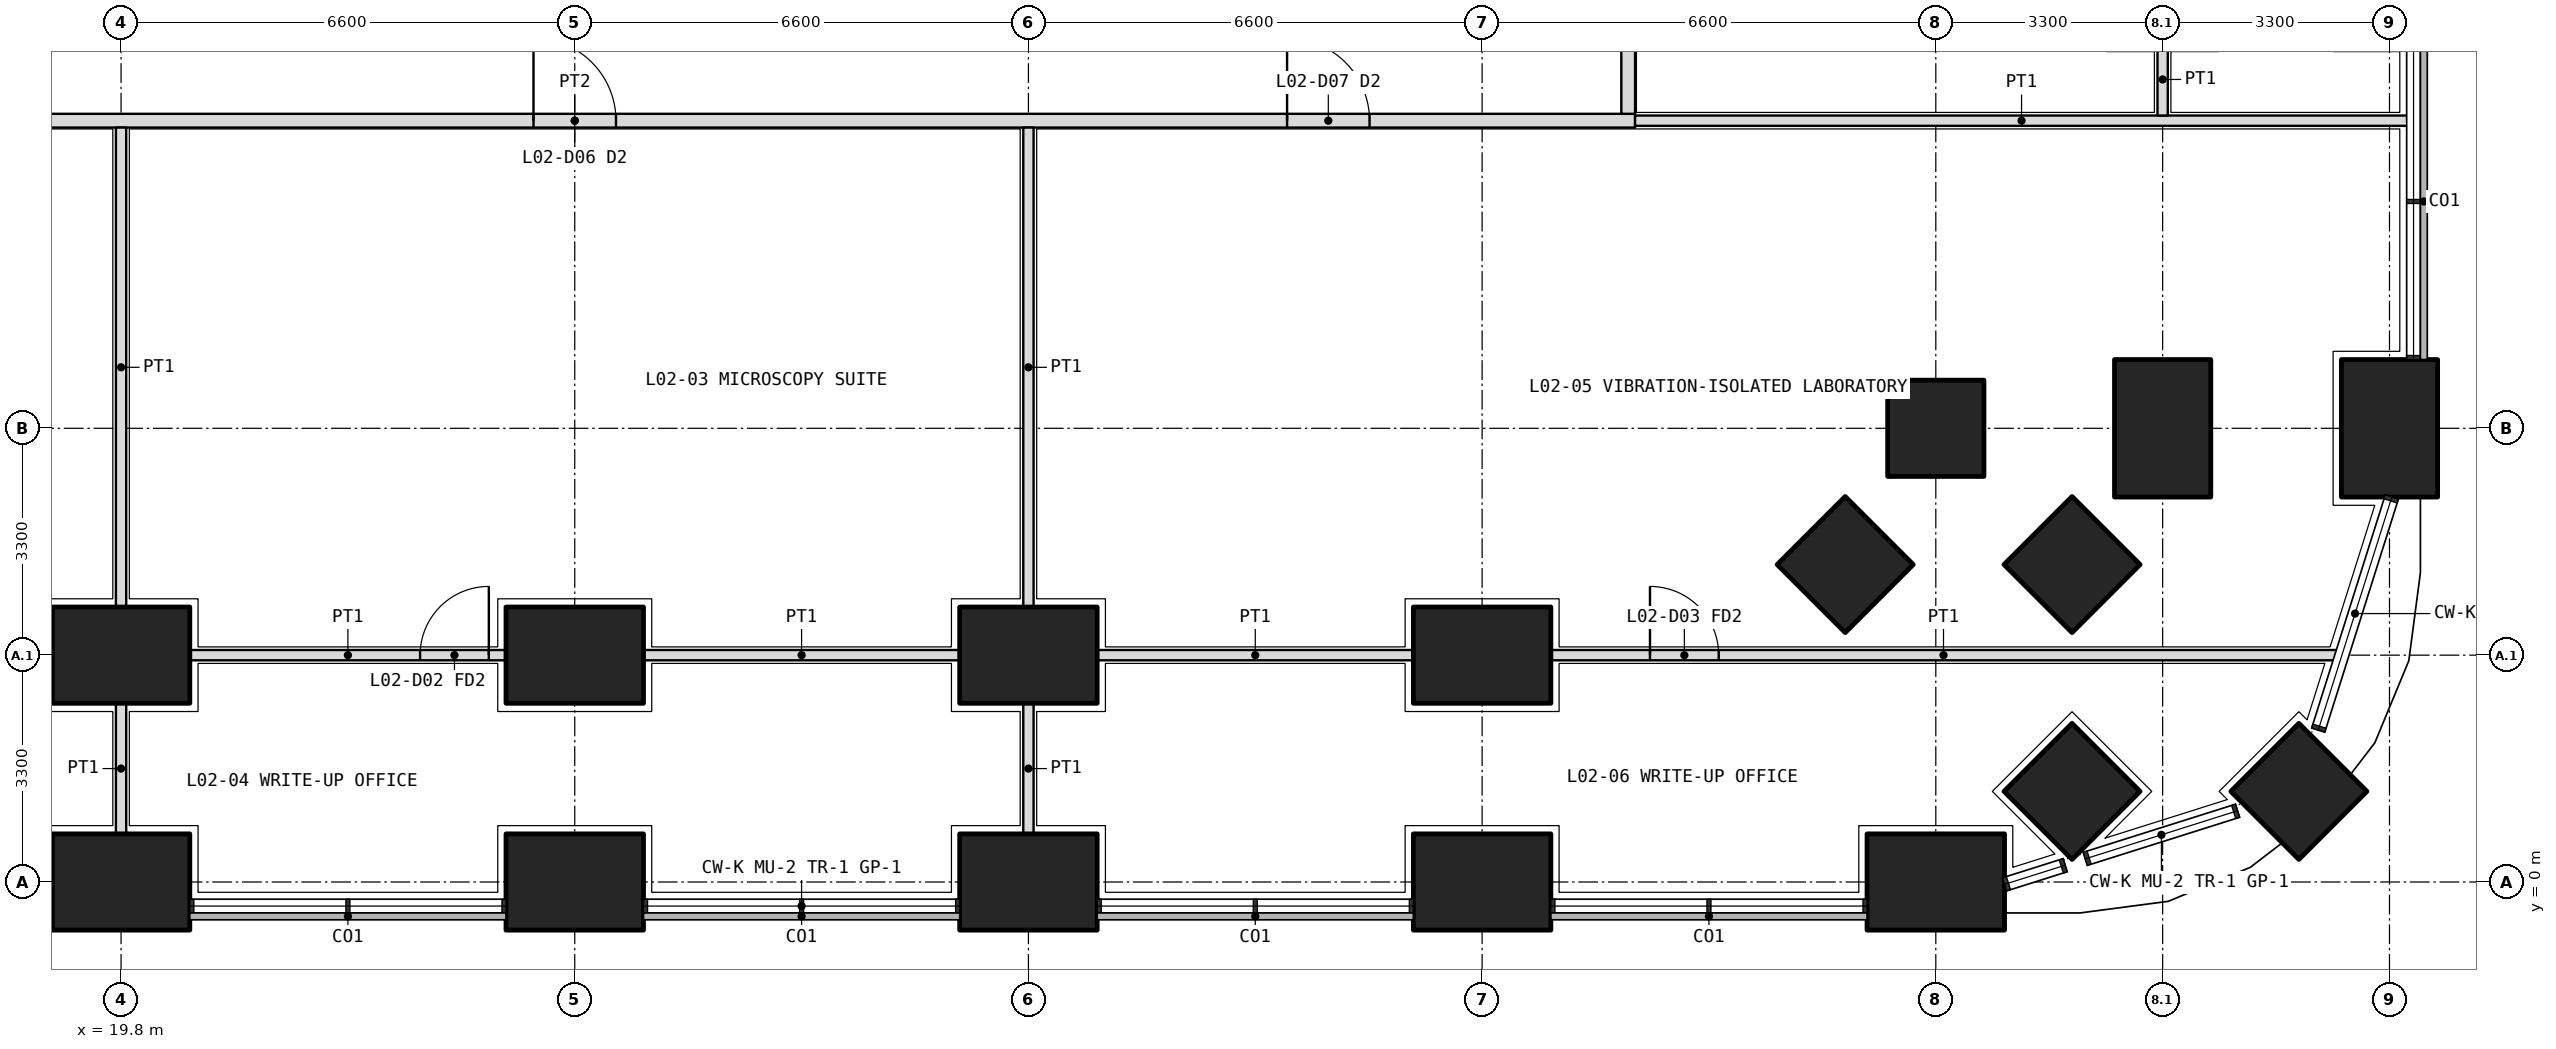
"""IFC4 building model, lengths in metres.
Left out: names, types, materials, properties, quantities, classifications, styles, units other than length and angle.
Written with IfcOpenShell. Run it as: python <this file> out.ifc"""

import sys

from ifc_helpers import new_model, si_unit, direction, frame, frame_2d, origin, origin_2d, place, context, subcontext, project, spatial, rectangle, extrude, element, fill, save


model = new_model("IFC4")
c1 = context("Model", 3, precision=1e-05, world=origin(), true_north=direction((0.0, 1.0)))
c2 = subcontext(c1, "Body", "Model", "MODEL_VIEW")
j1 = project(units=[si_unit("LENGTHUNIT", "METRE"), si_unit("PLANEANGLEUNIT", "RADIAN")], contexts=[c1])
p1 = place(None, origin())
s1 = spatial("IfcSite", under=j1, at=p1, CompositionType="ELEMENT")
p2 = place(p1, origin())
s2 = spatial("IfcBuilding", under=s1, at=p2, CompositionType="ELEMENT")
p3 = place(p2, frame((0.0, 0.0, 12.6)))
s3 = spatial("IfcBuildingStorey", under=s2, at=p3, CompositionType="ELEMENT", Elevation=12.6)
p4 = place(p3, frame((51.482, 1.318, 0.0), z_axis=(0.0, 0.0, 1.0), x_axis=(0.707106781187, 0.707106781187, 0.0)))
e1 = element("IfcColumn", 1, at=p4, inside=s3, PredefinedType="COLUMN", context=c2, shape_type="SweptSolid", body=[
    extrude(rectangle(XDim=1.4, YDim=1.4, at=origin_2d()), origin(), (0.0, 0.0, 1.0), 4.5),
])
for number, where, z_axis, x_axis in (
    (2, (19.8, 0.0, 0.0), (0.0, 0.0, 1.0), (1.0, 0.0, 0.0)),
    (3, (26.4, 0.0, 0.0), (0.0, 0.0, 1.0), (1.0, 0.0, 0.0)),
    (4, (33.0, 0.0, 0.0), (0.0, 0.0, 1.0), (1.0, 0.0, 0.0)),
    (5, (39.6, 0.0, 0.0), (0.0, 0.0, 1.0), (1.0, 0.0, 0.0)),
    (6, (46.2, 0.0, 0.0), (0.0, 0.0, 1.0), (1.0, 0.0, 0.0)),
    (7, (52.8, 6.6, 0.0), (0.0, 0.0, 1.0), (0.0, 1.0, 0.0)),
):
    element("IfcColumn", number, at=place(p3, frame(where, z_axis=z_axis, x_axis=x_axis)), inside=s3, PredefinedType="COLUMN", context=c2, shape_type="SweptSolid", body=[
        extrude(rectangle(XDim=2.0, YDim=1.4, at=origin_2d()), origin(), (0.0, 0.0, 1.0), 4.5),
    ])
for number, where, z_axis, x_axis in (
    (8, (46.2, 6.6, 0.0), (0.0, 0.0, 1.0), (1.0, 0.0, 0.0)),
    (9, (48.182, 1.318, 0.0), (0.0, 0.0, 1.0), (0.707, 0.707, 0.0)),
):
    element("IfcColumn", number, at=place(p3, frame(where, z_axis=z_axis, x_axis=x_axis)), inside=s3, PredefinedType="COLUMN", context=c2, shape_type="SweptSolid", body=[
        extrude(rectangle(XDim=1.4, YDim=1.4, at=origin_2d()), origin(), (0.0, 0.0, 1.0), 4.5),
    ])
p5 = place(p3, frame((49.5, 6.6, 0.0), z_axis=(0.0, 0.0, 1.0), x_axis=(0.0, 1.0, 0.0)))
e10 = element("IfcColumn", 10, at=p5, inside=s3, PredefinedType="COLUMN", context=c2, shape_type="SweptSolid", body=[
    extrude(rectangle(XDim=2.0, YDim=1.4, at=origin_2d()), origin(), (0.0, 0.0, 1.0), 4.5),
])
p6 = place(p3, frame((48.182, 4.618, 0.0), z_axis=(0.0, 0.0, 1.0), x_axis=(0.707106781187, 0.707106781187, 0.0)))
e11 = element("IfcColumn", 11, at=p6, inside=s3, PredefinedType="COLUMN", context=c2, shape_type="SweptSolid", body=[
    extrude(rectangle(XDim=1.4, YDim=1.4, at=origin_2d()), origin(), (0.0, 0.0, 1.0), 4.5),
])
for number, where, z_axis, x_axis in (
    (12, (19.8, 3.3, 0.0), (0.0, 0.0, 1.0), (1.0, 0.0, 0.0)),
    (13, (26.4, 3.3, 0.0), (0.0, 0.0, 1.0), (1.0, 0.0, 0.0)),
    (14, (33.0, 3.3, 0.0), (0.0, 0.0, 1.0), (1.0, 0.0, 0.0)),
    (15, (39.6, 3.3, 0.0), (0.0, 0.0, 1.0), (1.0, 0.0, 0.0)),
):
    element("IfcColumn", number, at=place(p3, frame(where, z_axis=z_axis, x_axis=x_axis)), inside=s3, PredefinedType="COLUMN", context=c2, shape_type="SweptSolid", body=[
        extrude(rectangle(XDim=2.0, YDim=1.4, at=origin_2d()), origin(), (0.0, 0.0, 1.0), 4.5),
    ])
p7 = place(p3, frame((44.882, 4.618, 0.0), z_axis=(0.0, 0.0, 1.0), x_axis=(0.707106781187, 0.707106781187, 0.0)))
e16 = element("IfcColumn", 16, at=p7, inside=s3, PredefinedType="COLUMN", context=c2, shape_type="SweptSolid", body=[
    extrude(rectangle(XDim=1.4, YDim=1.4, at=origin_2d()), origin(), (0.0, 0.0, 1.0), 4.5),
])
p8 = place(p3, frame((10.975, 11.075, 0.0), z_axis=(0.0, 0.0, 1.0), x_axis=(1.0, 0.0, 0.0)))
e17 = element("IfcWall", 17, at=p8, inside=s3, PredefinedType="PARTITIONING", context=c2, shape_type="SweptSolid", body=[
    extrude(rectangle(XDim=30.85, YDim=0.2, at=frame_2d((15.425, 0.0))), origin(), (0.0, 0.0, 1.0), 3.15),
])
p9 = place(p8, frame((3.863, 0.0, 0.0)))
e18 = element("IfcOpeningElement", 18, at=p9, cuts=e17, PredefinedType="OPENING", context=c2, shape_type="SweptSolid", body=[
    extrude(rectangle(XDim=1.2, YDim=2.1, at=frame_2d((0.6, 1.05))), frame((0.0, 0.11, 0.0), z_axis=(0.0, -1.0, 0.0), x_axis=(1.0, 0.0, 0.0)), (0.0, 0.0, 1.0), 0.22),
])
p10 = place(p8, frame((14.825, 0.0, 0.0)))
e19 = element("IfcOpeningElement", 19, at=p10, cuts=e17, PredefinedType="OPENING", context=c2, shape_type="SweptSolid", body=[
    extrude(rectangle(XDim=1.2, YDim=2.1, at=frame_2d((0.6, 1.05))), frame((0.0, 0.11, 0.0), z_axis=(0.0, -1.0, 0.0), x_axis=(1.0, 0.0, 0.0)), (0.0, 0.0, 1.0), 0.22),
])
p11 = place(p8, frame((25.788, 0.0, 0.0)))
e20 = element("IfcOpeningElement", 20, at=p11, cuts=e17, PredefinedType="OPENING", context=c2, shape_type="SweptSolid", body=[
    extrude(rectangle(XDim=1.2, YDim=2.1, at=frame_2d((0.6, 1.05))), frame((0.0, 0.11, 0.0), z_axis=(0.0, -1.0, 0.0), x_axis=(1.0, 0.0, 0.0)), (0.0, 0.0, 1.0), 0.22),
])
p12 = place(p3, frame((41.725, 11.175, 0.0), z_axis=(0.0, 0.0, 1.0), x_axis=(0.0, 1.0, 0.0)))
e21 = element("IfcWall", 21, at=p12, inside=s3, PredefinedType="PARTITIONING", context=c2, shape_type="SweptSolid", body=[
    extrude(rectangle(XDim=23.85, YDim=0.2, at=frame_2d((11.925, 0.0))), origin(), (0.0, 0.0, 1.0), 3.15),
])
p13 = place(p12, frame((3.663, 0.0, 0.0)))
e22 = element("IfcOpeningElement", 22, at=p13, cuts=e21, PredefinedType="OPENING", context=c2, shape_type="SweptSolid", body=[
    extrude(rectangle(XDim=1.2, YDim=2.1, at=frame_2d((0.6, 1.05))), frame((0.0, 0.11, 0.0), z_axis=(0.0, -1.0, 0.0), x_axis=(1.0, 0.0, 0.0)), (0.0, 0.0, 1.0), 0.22),
])
p14 = place(p12, frame((9.625, 0.0, 0.0)))
e23 = element("IfcOpeningElement", 23, at=p14, cuts=e21, PredefinedType="OPENING", context=c2, shape_type="SweptSolid", body=[
    extrude(rectangle(XDim=1.0, YDim=2.1, at=frame_2d((0.5, 1.05))), frame((0.0, 0.11, 0.0), z_axis=(0.0, -1.0, 0.0), x_axis=(1.0, 0.0, 0.0)), (0.0, 0.0, 1.0), 0.22),
])
p15 = place(p12, frame((12.975, 0.0, 0.0)))
e24 = element("IfcOpeningElement", 24, at=p15, cuts=e21, PredefinedType="OPENING", context=c2, shape_type="SweptSolid", body=[
    extrude(rectangle(XDim=0.9, YDim=2.1, at=frame_2d((0.45, 1.05))), frame((0.0, 0.11, 0.0), z_axis=(0.0, -1.0, 0.0), x_axis=(1.0, 0.0, 0.0)), (0.0, 0.0, 1.0), 0.22),
])
p16 = place(p12, frame((18.025, 0.0, 0.0)))
e25 = element("IfcOpeningElement", 25, at=p16, cuts=e21, PredefinedType="OPENING", context=c2, shape_type="SweptSolid", body=[
    extrude(rectangle(XDim=1.0, YDim=2.1, at=frame_2d((0.5, 1.05))), frame((0.0, 0.11, 0.0), z_axis=(0.0, -1.0, 0.0), x_axis=(1.0, 0.0, 0.0)), (0.0, 0.0, 1.0), 0.22),
])
p17 = place(p12, frame((22.288, 0.0, 0.0)))
e26 = element("IfcOpeningElement", 26, at=p17, cuts=e21, PredefinedType="OPENING", context=c2, shape_type="SweptSolid", body=[
    extrude(rectangle(XDim=1.2, YDim=2.1, at=frame_2d((0.6, 1.05))), frame((0.0, 0.11, 0.0), z_axis=(0.0, -1.0, 0.0), x_axis=(1.0, 0.0, 0.0)), (0.0, 0.0, 1.0), 0.22),
])
p18 = place(p3, frame((53.07, 11.075, 0.0), z_axis=(0.0, 0.0, 1.0), x_axis=(-1.0, 0.0, 0.0)))
e27 = element("IfcWall", 27, at=p18, inside=s3, PredefinedType="PARTITIONING", context=c2, shape_type="SweptSolid", body=[
    extrude(rectangle(XDim=11.245, YDim=0.15, at=frame_2d((5.623, 0.0))), origin(), (0.0, 0.0, 1.0), 3.0),
])
p19 = place(p3, frame((20.8, 3.3, 0.0), z_axis=(0.0, 0.0, 1.0), x_axis=(1.0, 0.0, 0.0)))
e28 = element("IfcWall", 28, at=p19, inside=s3, PredefinedType="PARTITIONING", context=c2, shape_type="SweptSolid", body=[
    extrude(rectangle(XDim=4.6, YDim=0.15, at=frame_2d((2.3, 0.0))), origin(), (0.0, 0.0, 1.0), 4.2),
])
p20 = place(p19, frame((3.35, 0.0, 0.0)))
e29 = element("IfcOpeningElement", 29, at=p20, cuts=e28, PredefinedType="OPENING", context=c2, shape_type="SweptSolid", body=[
    extrude(rectangle(XDim=1.0, YDim=2.1, at=frame_2d((0.5, 1.05))), frame((0.0, 0.085, 0.0), z_axis=(0.0, -1.0, 0.0), x_axis=(1.0, 0.0, 0.0)), (0.0, 0.0, 1.0), 0.17),
])
for number, where, z_axis, x_axis in (
    (30, (27.4, 3.3, 0.0), (0.0, 0.0, 1.0), (1.0, 0.0, 0.0)),
    (31, (34.0, 3.3, 0.0), (0.0, 0.0, 1.0), (1.0, 0.0, 0.0)),
):
    element("IfcWall", number, at=place(p3, frame(where, z_axis=z_axis, x_axis=x_axis)), inside=s3, PredefinedType="PARTITIONING", context=c2, shape_type="SweptSolid", body=[
        extrude(rectangle(XDim=4.6, YDim=0.15, at=frame_2d((2.3, 0.0))), origin(), (0.0, 0.0, 1.0), 4.2),
    ])
p21 = place(p3, frame((40.6, 3.3, 0.0), z_axis=(0.0, 0.0, 1.0), x_axis=(1.0, 0.0, 0.0)))
e32 = element("IfcWall", 32, at=p21, inside=s3, PredefinedType="PARTITIONING", context=c2, shape_type="SweptSolid", body=[
    extrude(rectangle(XDim=11.424, YDim=0.15, at=frame_2d((5.712, 0.0))), origin(), (0.0, 0.0, 1.0), 3.0),
])
p22 = place(p21, frame((1.442, 0.0, 0.0)))
e33 = element("IfcOpeningElement", 33, at=p22, cuts=e32, PredefinedType="OPENING", context=c2, shape_type="SweptSolid", body=[
    extrude(rectangle(XDim=1.0, YDim=2.1, at=frame_2d((0.5, 1.05))), frame((0.0, 0.085, 0.0), z_axis=(0.0, -1.0, 0.0), x_axis=(1.0, 0.0, 0.0)), (0.0, 0.0, 1.0), 0.17),
])
p23 = place(p3, frame((19.8, 0.7, 0.0), z_axis=(0.0, 0.0, 1.0), x_axis=(0.0, 1.0, 0.0)))
e34 = element("IfcWall", 34, at=p23, inside=s3, PredefinedType="PARTITIONING", context=c2, shape_type="SweptSolid", body=[
    extrude(rectangle(XDim=1.9, YDim=0.15, at=frame_2d((0.95, 0.0))), origin(), (0.0, 0.0, 1.0), 3.15),
])
p24 = place(p3, frame((19.8, 4.0, 0.0), z_axis=(0.0, 0.0, 1.0), x_axis=(0.0, 1.0, 0.0)))
e35 = element("IfcWall", 35, at=p24, inside=s3, PredefinedType="PARTITIONING", context=c2, shape_type="SweptSolid", body=[
    extrude(rectangle(XDim=6.975, YDim=0.15, at=frame_2d((3.488, 0.0))), origin(), (0.0, 0.0, 1.0), 3.15),
])
p25 = place(p3, frame((33.0, 0.7, 0.0), z_axis=(0.0, 0.0, 1.0), x_axis=(0.0, 1.0, 0.0)))
e36 = element("IfcWall", 36, at=p25, inside=s3, PredefinedType="PARTITIONING", context=c2, shape_type="SweptSolid", body=[
    extrude(rectangle(XDim=1.9, YDim=0.15, at=frame_2d((0.95, 0.0))), origin(), (0.0, 0.0, 1.0), 3.15),
])
p26 = place(p3, frame((33.0, 4.0, 0.0), z_axis=(0.0, 0.0, 1.0), x_axis=(0.0, 1.0, 0.0)))
e37 = element("IfcWall", 37, at=p26, inside=s3, PredefinedType="PARTITIONING", context=c2, shape_type="SweptSolid", body=[
    extrude(rectangle(XDim=6.975, YDim=0.15, at=frame_2d((3.488, 0.0))), origin(), (0.0, 0.0, 1.0), 3.15),
])
p27 = place(p3, frame((49.5, 11.15, 0.0), z_axis=(0.0, 0.0, 1.0), x_axis=(0.0, 1.0, 0.0)))
e38 = element("IfcWall", 38, at=p27, inside=s3, PredefinedType="PARTITIONING", context=c2, shape_type="SweptSolid", body=[
    extrude(rectangle(XDim=1.05, YDim=0.15, at=frame_2d((0.525, 0.0))), origin(), (0.0, 0.0, 1.0), 4.2),
])
p28 = place(p10, origin())
e39 = element("IfcDoor", 39, at=p28, inside=s3, OperationType="DOUBLE_DOOR_SINGLE_SWING", PredefinedType="DOOR", context=c2, shape_type="SweptSolid", body=[
    extrude(rectangle(XDim=1.2, YDim=2.1, at=frame_2d((0.6, 1.05))), frame((0.0, 0.025, 0.0), z_axis=(0.0, -1.0, 0.0), x_axis=(1.0, 0.0, 0.0)), (0.0, 0.0, 1.0), 0.05),
])
fill(e19, e39)
p29 = place(p20, origin())
e40 = element("IfcDoor", 40, at=p29, inside=s3, OperationType="SINGLE_SWING_RIGHT", PredefinedType="DOOR", context=c2, shape_type="SweptSolid", body=[
    extrude(rectangle(XDim=1.0, YDim=2.1, at=frame_2d((0.5, 1.05))), frame((0.0, 0.025, 0.0), z_axis=(0.0, -1.0, 0.0), x_axis=(1.0, 0.0, 0.0)), (0.0, 0.0, 1.0), 0.05),
])
fill(e29, e40)
p30 = place(p11, origin())
e41 = element("IfcDoor", 41, at=p30, inside=s3, OperationType="DOUBLE_DOOR_SINGLE_SWING", PredefinedType="DOOR", context=c2, shape_type="SweptSolid", body=[
    extrude(rectangle(XDim=1.2, YDim=2.1, at=frame_2d((0.6, 1.05))), frame((0.0, 0.025, 0.0), z_axis=(0.0, -1.0, 0.0), x_axis=(1.0, 0.0, 0.0)), (0.0, 0.0, 1.0), 0.05),
])
fill(e20, e41)
p31 = place(p22, origin())
e42 = element("IfcDoor", 42, at=p31, inside=s3, OperationType="SINGLE_SWING_LEFT", PredefinedType="DOOR", context=c2, shape_type="SweptSolid", body=[
    extrude(rectangle(XDim=1.0, YDim=2.1, at=frame_2d((0.5, 1.05))), frame((0.0, 0.025, 0.0), z_axis=(0.0, -1.0, 0.0), x_axis=(1.0, 0.0, 0.0)), (0.0, 0.0, 1.0), 0.05),
])
fill(e33, e42)
save(model, sys.argv[1])
